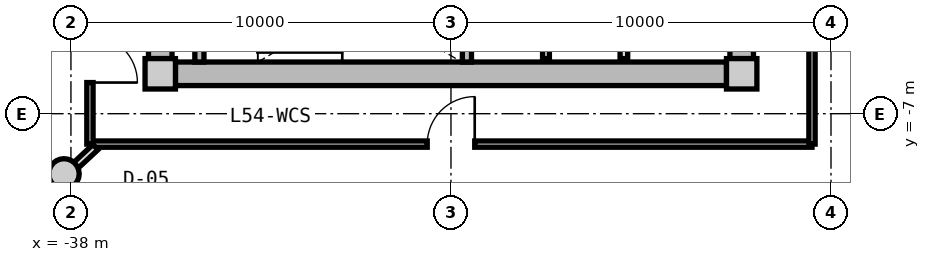
"""IFC4 building model, lengths in metres.
Left out: names, types, materials, properties, quantities, classifications, styles, units other than length and angle.
Written with IfcOpenShell. Run it as: python <this file> out.ifc"""

import sys

from ifc_helpers import new_model, si_unit, direction, frame, frame_2d, origin, origin_2d, place, context, subcontext, project, spatial, rectangle, circle, extrude, source, transform, mapped, element, fill, save


model = new_model("IFC4")
c1 = context("Model", 3, precision=1e-05, world=origin(), true_north=direction((0.0, 1.0)))
c2 = subcontext(c1, "Body", "Model", "MODEL_VIEW")
j1 = project(units=[si_unit("LENGTHUNIT", "METRE"), si_unit("PLANEANGLEUNIT", "RADIAN")], contexts=[c1])
p1 = place(None, origin())
s1 = spatial("IfcSite", under=j1, at=p1, CompositionType="ELEMENT")
p2 = place(p1, origin())
s2 = spatial("IfcBuilding", under=s1, at=p2, CompositionType="ELEMENT")
p3 = place(p2, frame((0.0, 0.0, 173.95)))
s3 = spatial("IfcBuildingStorey", under=s2, at=p3, CompositionType="ELEMENT", Elevation=173.95)
m1 = source(origin(), c2, "Body", "SweptSolid", [
    extrude(rectangle(XDim=0.8, YDim=0.8, at=origin_2d()), origin(), (0.0, 0.0, 1.0), 3.05),
])
for number, where, z_axis, x_axis in (
    (1, (-35.65, -5.95, 0.0), (0.0, 0.0, 1.0), (1.0, 0.0, 0.0)),
    (2, (-20.35, -5.95, 0.0), (0.0, 0.0, 1.0), (1.0, 0.0, 0.0)),
):
    element("IfcColumn", number, at=place(p3, frame(where, z_axis=z_axis, x_axis=x_axis)), inside=s3, PredefinedType="COLUMN", context=c2, shape_type="MappedRepresentation", body=[
        mapped(m1, transform((0.0, 0.0, 0.0), x_axis=(1.0, 0.0, 0.0), y_axis=(0.0, 1.0, 0.0), z_axis=(0.0, 0.0, 1.0), scale=1.0)),
    ])
m2 = source(origin(), c2, "Body", "SweptSolid", [
    extrude(rectangle(XDim=14.5, YDim=0.62, at=frame_2d((7.25, 0.0))), origin(), (0.0, 0.0, 1.0), 2.81),
])
p4 = place(p3, frame((-20.75, -5.95, 0.0), z_axis=(0.0, 0.0, 1.0), x_axis=(-1.0, 0.0, 0.0)))
e3 = element("IfcWall", 3, at=p4, inside=s3, PredefinedType="SHEAR", context=c2, shape_type="MappedRepresentation", body=[
    mapped(m2, transform((0.0, 0.0, 0.0), x_axis=(1.0, 0.0, 0.0), y_axis=(0.0, 1.0, 0.0), z_axis=(0.0, 0.0, 1.0), scale=1.0)),
])
m3 = source(origin(), c2, "Body", "SweptSolid", [
    extrude(rectangle(XDim=11.1, YDim=0.62, at=frame_2d((5.55, 0.0))), origin(), (0.0, 0.0, 1.0), 2.81),
])
p5 = place(p3, frame((-35.65, -5.55, 0.0), z_axis=(0.0, 0.0, 1.0), x_axis=(0.0, 1.0, 0.0)))
e4 = element("IfcWall", 4, at=p5, inside=s3, PredefinedType="SHEAR", context=c2, shape_type="MappedRepresentation", body=[
    mapped(m3, transform((0.0, 0.0, 0.0), x_axis=(1.0, 0.0, 0.0), y_axis=(0.0, 1.0, 0.0), z_axis=(0.0, 0.0, 1.0), scale=1.0)),
])
p6 = place(p5, frame((3.8, 0.0, 0.0)))
e5 = element("IfcOpeningElement", 5, at=p6, cuts=e4, PredefinedType="OPENING", context=c2, shape_type="SweptSolid", body=[
    extrude(rectangle(XDim=1.2, YDim=2.15, at=frame_2d((0.6, 1.075))), frame((0.0, 0.32, 0.0), z_axis=(0.0, -1.0, 0.0), x_axis=(1.0, 0.0, 0.0)), (0.0, 0.0, 1.0), 0.64),
])
p7 = place(p3, frame((-20.35, 5.55, 0.0), z_axis=(0.0, 0.0, 1.0), x_axis=(0.0, -1.0, 0.0)))
e6 = element("IfcWall", 6, at=p7, inside=s3, PredefinedType="SHEAR", context=c2, shape_type="MappedRepresentation", body=[
    mapped(m3, transform((0.0, 0.0, 0.0), x_axis=(1.0, 0.0, 0.0), y_axis=(0.0, 1.0, 0.0), z_axis=(0.0, 0.0, 1.0), scale=1.0)),
])
p8 = place(p7, frame((5.65, 0.0, 0.0)))
e7 = element("IfcOpeningElement", 7, at=p8, cuts=e6, PredefinedType="OPENING", context=c2, shape_type="SweptSolid", body=[
    extrude(rectangle(XDim=1.2, YDim=2.15, at=frame_2d((0.6, 1.075))), frame((0.0, 0.32, 0.0), z_axis=(0.0, -1.0, 0.0), x_axis=(1.0, 0.0, 0.0)), (0.0, 0.0, 1.0), 0.64),
])
m4 = source(origin(), c2, "Body", "SweptSolid", [
    extrude(circle(Radius=0.4, at=origin_2d()), origin(), (0.0, 0.0, 1.0), 3.05),
])
p9 = place(p3, frame((-38.183, -8.584, 0.0), z_axis=(0.0, 0.0, 1.0), x_axis=(1.0, 0.0, 0.0)))
e8 = element("IfcColumn", 8, at=p9, inside=s3, PredefinedType="COLUMN", context=c2, shape_type="MappedRepresentation", body=[
    mapped(m4, transform((0.0, 0.0, 0.0), x_axis=(1.0, 0.0, 0.0), y_axis=(0.0, 1.0, 0.0), z_axis=(0.0, 0.0, 1.0), scale=1.0)),
])
m5 = source(origin(), c2, "Body", "SweptSolid", [
    extrude(rectangle(XDim=3.19, YDim=0.24, at=frame_2d((1.595, 0.0))), origin(), (0.0, 0.0, 1.0), 2.81),
])
for number, where, z_axis, x_axis in (
    (9, (-34.62, -5.64, 0.0), (0.0, 0.0, 1.0), (0.0, 1.0, 0.0)),
    (10, (-27.58, -5.64, 0.0), (0.0, 0.0, 1.0), (0.0, 1.0, 0.0)),
):
    element("IfcWall", number, at=place(p3, frame(where, z_axis=z_axis, x_axis=x_axis)), inside=s3, PredefinedType="PARTITIONING", context=c2, shape_type="MappedRepresentation", body=[
        mapped(m5, transform((0.0, 0.0, 0.0), x_axis=(1.0, 0.0, 0.0), y_axis=(0.0, 1.0, 0.0), z_axis=(0.0, 0.0, 1.0), scale=1.0)),
    ])
m6 = source(origin(), c2, "Body", "SweptSolid", [
    extrude(rectangle(XDim=3.8, YDim=0.2, at=frame_2d((1.9, 0.0))), origin(), (0.0, 0.0, 1.0), 2.795),
])
p10 = place(p3, frame((-23.45, -5.55, 0.0), z_axis=(0.0, 0.0, 1.0), x_axis=(0.0, 1.0, 0.0)))
e11 = element("IfcWall", 11, at=p10, inside=s3, PredefinedType="PARTITIONING", context=c2, shape_type="MappedRepresentation", body=[
    mapped(m6, transform((0.0, 0.0, 0.0), x_axis=(1.0, 0.0, 0.0), y_axis=(0.0, 1.0, 0.0), z_axis=(0.0, 0.0, 1.0), scale=1.0)),
])
m7 = source(origin(), c2, "Body", "SweptSolid", [
    extrude(rectangle(XDim=4.2, YDim=0.18, at=frame_2d((2.1, 0.0))), origin(), (0.0, 0.0, 1.0), 2.795),
])
p11 = place(p3, frame((-25.5, -5.55, 0.0), z_axis=(0.0, 0.0, 1.0), x_axis=(0.0, 1.0, 0.0)))
e12 = element("IfcWall", 12, at=p11, inside=s3, PredefinedType="PARTITIONING", context=c2, shape_type="MappedRepresentation", body=[
    mapped(m7, transform((0.0, 0.0, 0.0), x_axis=(1.0, 0.0, 0.0), y_axis=(0.0, 1.0, 0.0), z_axis=(0.0, 0.0, 1.0), scale=1.0)),
])
m8 = source(origin(), c2, "Body", "SweptSolid", [
    extrude(rectangle(XDim=19.0, YDim=0.165, at=frame_2d((9.5, 0.0))), origin(), (0.0, 0.0, 1.0), 2.795),
])
p12 = place(p3, frame((-18.5, -7.8, 0.0), z_axis=(0.0, 0.0, 1.0), x_axis=(-1.0, 0.0, 0.0)))
e13 = element("IfcWall", 13, at=p12, inside=s3, PredefinedType="PARTITIONING", context=c2, shape_type="MappedRepresentation", body=[
    mapped(m8, transform((0.0, 0.0, 0.0), x_axis=(1.0, 0.0, 0.0), y_axis=(0.0, 1.0, 0.0), z_axis=(0.0, 0.0, 1.0), scale=1.0)),
])
p13 = place(p12, frame((8.875, 0.0, 0.0)))
e14 = element("IfcOpeningElement", 14, at=p13, cuts=e13, PredefinedType="OPENING", context=c2, shape_type="SweptSolid", body=[
    extrude(rectangle(XDim=1.25, YDim=2.2, at=frame_2d((0.625, 1.1))), frame((0.0, 0.093, 0.0), z_axis=(0.0, -1.0, 0.0), x_axis=(1.0, 0.0, 0.0)), (0.0, 0.0, 1.0), 0.185),
])
m9 = source(origin(), c2, "Body", "SweptSolid", [
    extrude(rectangle(XDim=6.88, YDim=0.165, at=frame_2d((3.44, 0.0))), origin(), (0.0, 0.0, 1.0), 2.795),
])
p14 = place(p3, frame((-37.5, -7.8, 0.0), z_axis=(0.0, 0.0, 1.0), x_axis=(0.0, 1.0, 0.0)))
e15 = element("IfcWall", 15, at=p14, inside=s3, PredefinedType="PARTITIONING", context=c2, shape_type="MappedRepresentation", body=[
    mapped(m9, transform((0.0, 0.0, 0.0), x_axis=(1.0, 0.0, 0.0), y_axis=(0.0, 1.0, 0.0), z_axis=(0.0, 0.0, 1.0), scale=1.0)),
])
p15 = place(p14, frame((1.62, 0.0, 0.0)))
e16 = element("IfcOpeningElement", 16, at=p15, cuts=e15, PredefinedType="OPENING", context=c2, shape_type="SweptSolid", body=[
    extrude(rectangle(XDim=1.25, YDim=2.2, at=frame_2d((0.625, 1.1))), frame((0.0, 0.093, 0.0), z_axis=(0.0, -1.0, 0.0), x_axis=(1.0, 0.0, 0.0)), (0.0, 0.0, 1.0), 0.185),
])
m10 = source(origin(), c2, "Body", "SweptSolid", [
    extrude(rectangle(XDim=7.365, YDim=0.165, at=frame_2d((3.682, 0.0))), origin(), (0.0, 0.0, 1.0), 2.795),
])
p16 = place(p3, frame((-18.5, -0.436, 0.0), z_axis=(0.0, 0.0, 1.0), x_axis=(0.0, -1.0, 0.0)))
e17 = element("IfcWall", 17, at=p16, inside=s3, PredefinedType="PARTITIONING", context=c2, shape_type="MappedRepresentation", body=[
    mapped(m10, transform((0.0, 0.0, 0.0), x_axis=(1.0, 0.0, 0.0), y_axis=(0.0, 1.0, 0.0), z_axis=(0.0, 0.0, 1.0), scale=1.0)),
])
m11 = source(origin(), c2, "Body", "SweptSolid", [
    extrude(rectangle(XDim=2.435, YDim=0.19, at=frame_2d((1.217, 0.0))), origin(), (0.0, 0.0, 1.0), 2.345),
])
p17 = place(p3, frame((-37.354, -7.88, 0.0), z_axis=(0.0, 0.0, 1.0), x_axis=(-0.732164643118, -0.681127693878, 0.0)))
e18 = element("IfcWall", 18, at=p17, inside=s3, PredefinedType="PARTITIONING", context=c2, shape_type="MappedRepresentation", body=[
    mapped(m11, transform((0.0, 0.0, 0.0), x_axis=(1.0, 0.0, 0.0), y_axis=(0.0, 1.0, 0.0), z_axis=(0.0, 0.0, 1.0), scale=1.0)),
])
m12 = source(origin(), c2, "Body", "SweptSolid", [
    extrude(rectangle(XDim=1.25, YDim=2.2, at=frame_2d((0.625, 1.1))), frame((0.0, 0.025, 0.0), z_axis=(0.0, -1.0, 0.0), x_axis=(1.0, 0.0, 0.0)), (0.0, 0.0, 1.0), 0.05),
])
p18 = place(p15, frame((1.25, 0.0, 0.0), z_axis=(0.0, 0.0, 1.0), x_axis=(-1.0, 0.0, 0.0)))
e19 = element("IfcDoor", 19, at=p18, inside=s3, OperationType="SINGLE_SWING_RIGHT", PredefinedType="DOOR", context=c2, shape_type="MappedRepresentation", body=[
    mapped(m12, transform((0.0, 0.0, 0.0), x_axis=(1.0, 0.0, 0.0), y_axis=(0.0, 1.0, 0.0), z_axis=(0.0, 0.0, 1.0), scale=1.0)),
])
fill(e16, e19)
p19 = place(p13, frame((1.25, 0.0, 0.0), z_axis=(0.0, 0.0, 1.0), x_axis=(-1.0, 0.0, 0.0)))
e20 = element("IfcDoor", 20, at=p19, inside=s3, OperationType="SINGLE_SWING_RIGHT", PredefinedType="DOOR", context=c2, shape_type="MappedRepresentation", body=[
    mapped(m12, transform((0.0, 0.0, 0.0), x_axis=(1.0, 0.0, 0.0), y_axis=(0.0, 1.0, 0.0), z_axis=(0.0, 0.0, 1.0), scale=1.0)),
])
fill(e14, e20)
save(model, sys.argv[1])
